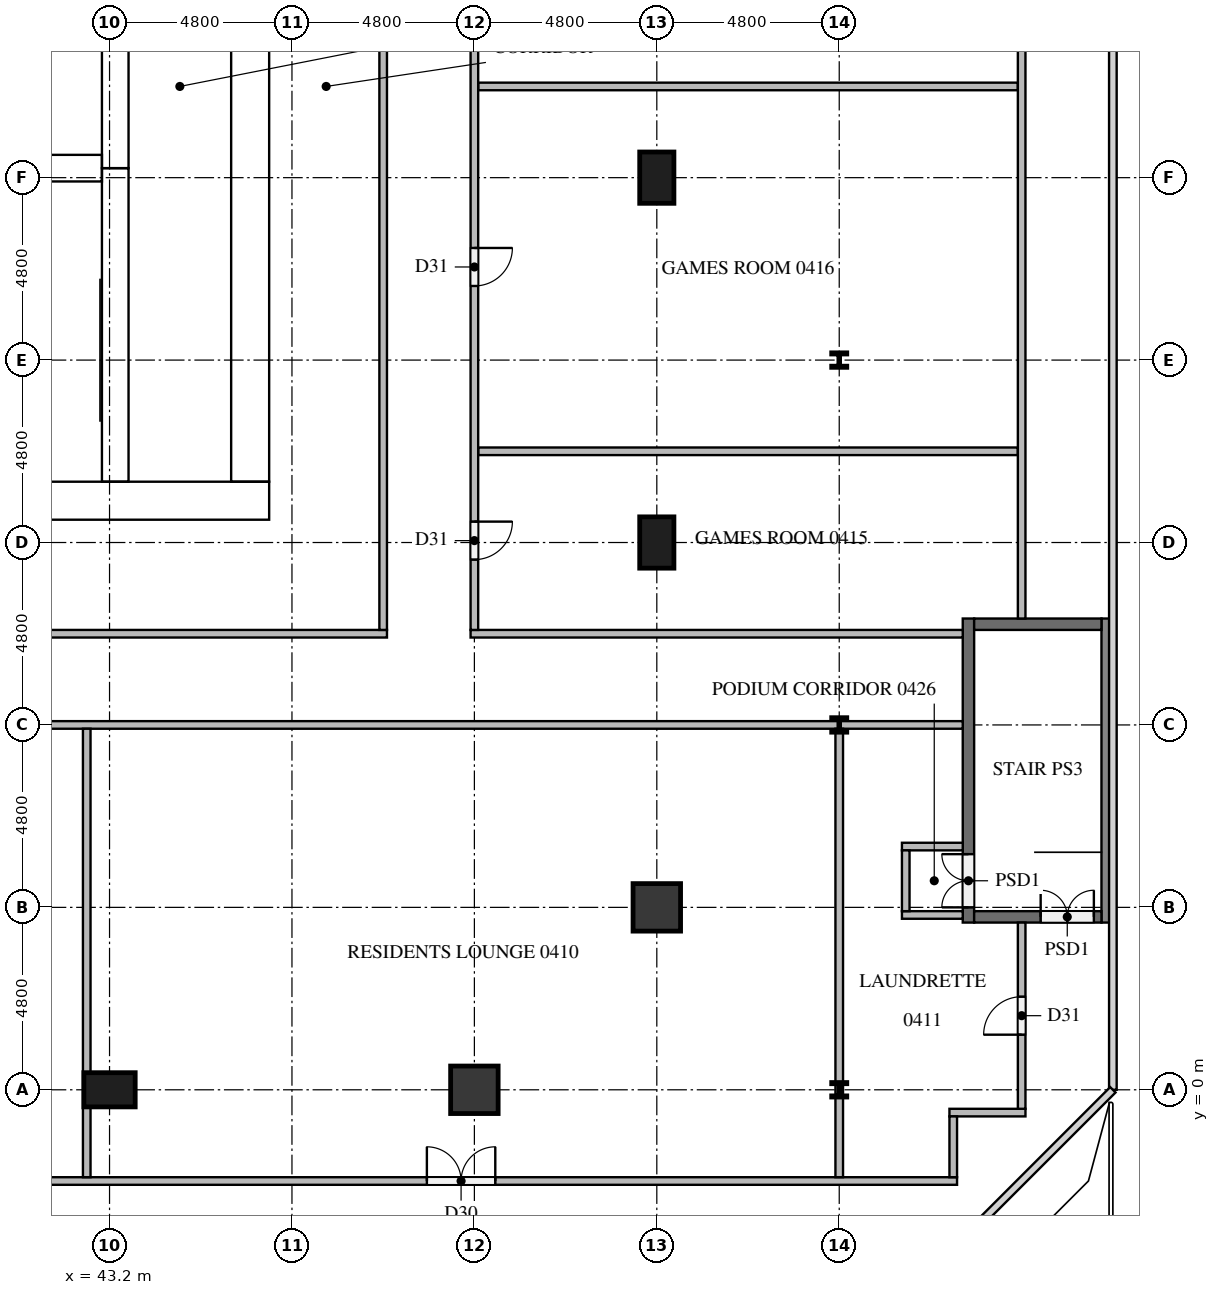
"""IFC4 building model, lengths in metres.
Left out: names, types, materials, properties, quantities, classifications, styles, units other than length and angle.
Written with IfcOpenShell. Run it as: python <this file> out.ifc"""

import sys

from ifc_helpers import new_model, si_unit, direction, frame, frame_2d, origin, origin_2d, place, context, subcontext, project, spatial, rectangle, i_section, extrude, element, fill, save


model = new_model("IFC4")
c1 = context("Model", 3, precision=1e-05, world=origin(), true_north=direction((0.0, 1.0)))
c2 = subcontext(c1, "Body", "Model", "MODEL_VIEW")
j1 = project(units=[si_unit("LENGTHUNIT", "METRE"), si_unit("PLANEANGLEUNIT", "RADIAN")], contexts=[c1])
p1 = place(None, origin())
s1 = spatial("IfcSite", under=j1, at=p1, CompositionType="ELEMENT")
p2 = place(p1, origin())
s2 = spatial("IfcBuilding", under=s1, at=p2, CompositionType="ELEMENT")
p3 = place(p2, frame((0.0, 0.0, 19.5)))
s3 = spatial("IfcBuildingStorey", under=s2, at=p3, CompositionType="ELEMENT", Elevation=19.5)
p4 = place(p3, frame((65.8, 4.4, 0.0), z_axis=(0.0, 0.0, 1.0), x_axis=(0.0, 1.0, 0.0)))
e1 = element("IfcWall", 1, at=p4, inside=s3, PredefinedType="SOLIDWALL", context=c2, shape_type="SweptSolid", body=[
    extrude(rectangle(XDim=8.0, YDim=0.3, at=frame_2d((4.0, 0.0))), origin(), (0.0, 0.0, 1.0), 4.1),
])
p5 = place(p4, frame((0.4, 0.0, 0.0)))
e2 = element("IfcOpeningElement", 2, at=p5, cuts=e1, PredefinedType="OPENING", context=c2, shape_type="SweptSolid", body=[
    extrude(rectangle(XDim=1.4, YDim=2.1, at=frame_2d((0.7, 1.05))), frame((0.0, 0.16, 0.0), z_axis=(0.0, -1.0, 0.0), x_axis=(1.0, 0.0, 0.0)), (0.0, 0.0, 1.0), 0.32),
])
p6 = place(p3, frame((69.45, 4.4, 0.0), z_axis=(0.0, 0.0, 1.0), x_axis=(0.0, 1.0, 0.0)))
e3 = element("IfcWall", 3, at=p6, inside=s3, PredefinedType="SOLIDWALL", context=c2, shape_type="SweptSolid", body=[
    extrude(rectangle(XDim=8.0, YDim=0.3, at=frame_2d((4.0, 0.0))), origin(), (0.0, 0.0, 1.0), 4.1),
])
p7 = place(p3, frame((65.95, 4.55, 0.0), z_axis=(0.0, 0.0, 1.0), x_axis=(1.0, 0.0, 0.0)))
e4 = element("IfcWall", 4, at=p7, inside=s3, PredefinedType="SOLIDWALL", context=c2, shape_type="SweptSolid", body=[
    extrude(rectangle(XDim=3.35, YDim=0.3, at=frame_2d((1.675, 0.0))), origin(), (0.0, 0.0, 1.0), 4.1),
])
p8 = place(p7, frame((1.75, 0.0, 0.0)))
e5 = element("IfcOpeningElement", 5, at=p8, cuts=e4, PredefinedType="OPENING", context=c2, shape_type="SweptSolid", body=[
    extrude(rectangle(XDim=1.4, YDim=2.1, at=frame_2d((0.7, 1.05))), frame((0.0, 0.16, 0.0), z_axis=(0.0, -1.0, 0.0), x_axis=(1.0, 0.0, 0.0)), (0.0, 0.0, 1.0), 0.32),
])
p9 = place(p3, frame((65.95, 12.25, 0.0), z_axis=(0.0, 0.0, 1.0), x_axis=(1.0, 0.0, 0.0)))
e6 = element("IfcWall", 6, at=p9, inside=s3, PredefinedType="SOLIDWALL", context=c2, shape_type="SweptSolid", body=[
    extrude(rectangle(XDim=3.35, YDim=0.3, at=frame_2d((1.675, 0.0))), origin(), (0.0, 0.0, 1.0), 4.1),
])
p10 = place(p3, frame((15.0, 15.5, 0.0), z_axis=(0.0, 0.0, 1.0), x_axis=(1.0, 0.0, 0.0)))
e7 = element("IfcWall", 7, at=p10, inside=s3, PredefinedType="SHEAR", context=c2, shape_type="SweptSolid", body=[
    extrude(rectangle(XDim=32.4, YDim=1.0, at=frame_2d((16.2, 0.0))), origin(), (0.0, 0.0, 1.0), 4.1),
])
p11 = place(p10, frame((15.3, 0.0, 0.0)))
e8 = element("IfcOpeningElement", 8, at=p11, cuts=e7, PredefinedType="OPENING", context=c2, shape_type="SweptSolid", body=[
    extrude(rectangle(XDim=1.8, YDim=2.1, at=frame_2d((0.9, 1.05))), frame((0.0, 0.51, 0.0), z_axis=(0.0, -1.0, 0.0), x_axis=(1.0, 0.0, 0.0)), (0.0, 0.0, 1.0), 1.02),
])
p12 = place(p3, frame((46.9, 16.0, 0.0), z_axis=(0.0, 0.0, 1.0), x_axis=(0.0, 1.0, 0.0)))
e9 = element("IfcWall", 9, at=p12, inside=s3, PredefinedType="SHEAR", context=c2, shape_type="SweptSolid", body=[
    extrude(rectangle(XDim=20.8, YDim=1.0, at=frame_2d((10.4, 0.0))), origin(), (0.0, 0.0, 1.0), 4.1),
])
p13 = place(p12, frame((10.1, 0.0, 0.0)))
e10 = element("IfcOpeningElement", 10, at=p13, cuts=e9, PredefinedType="OPENING", context=c2, shape_type="SweptSolid", body=[
    extrude(rectangle(XDim=1.2, YDim=2.1, at=frame_2d((0.6, 1.05))), frame((0.0, 0.51, 0.0), z_axis=(0.0, -1.0, 0.0), x_axis=(1.0, 0.0, 0.0)), (0.0, 0.0, 1.0), 1.02),
])
p14 = place(p3, frame((43.35, 16.0, 0.0), z_axis=(0.0, 0.0, 1.0), x_axis=(0.0, 1.0, 0.0)))
e11 = element("IfcWall", 11, at=p14, inside=s3, PredefinedType="SHEAR", context=c2, shape_type="SweptSolid", body=[
    extrude(rectangle(XDim=8.25, YDim=0.7, at=frame_2d((4.125, 0.0))), origin(), (0.0, 0.0, 1.0), 4.1),
])
p15 = place(p14, frame((0.2, 0.0, 0.0)))
e12 = element("IfcOpeningElement", 12, at=p15, cuts=e11, PredefinedType="OPENING", context=c2, shape_type="SweptSolid", body=[
    extrude(rectangle(XDim=1.2, YDim=2.1, at=frame_2d((0.6, 1.05))), frame((0.0, 0.36, 0.0), z_axis=(0.0, -1.0, 0.0), x_axis=(1.0, 0.0, 0.0)), (0.0, 0.0, 1.0), 0.72),
])
p16 = place(p3, frame((43.35, 24.25, 0.0), z_axis=(0.0, 0.0, 1.0), x_axis=(0.0, 1.0, 0.0)))
e13 = element("IfcWall", 13, at=p16, inside=s3, PredefinedType="SHEAR", context=c2, shape_type="SweptSolid", body=[
    extrude(rectangle(XDim=3.5, YDim=0.7, at=frame_2d((1.75, 0.0))), origin(), (0.0, 0.0, 1.0), 4.1),
])
p17 = place(p16, frame((1.2, 0.0, 0.0)))
e14 = element("IfcOpeningElement", 14, at=p17, cuts=e13, PredefinedType="OPENING", context=c2, shape_type="SweptSolid", body=[
    extrude(rectangle(XDim=1.1, YDim=2.1, at=frame_2d((0.55, 1.05))), frame((0.0, 0.36, 0.0), z_axis=(0.0, -1.0, 0.0), x_axis=(1.0, 0.0, 0.0)), (0.0, 0.0, 1.0), 0.72),
])
p18 = place(p3, frame((39.65, 24.25, 0.0), z_axis=(0.0, 0.0, 1.0), x_axis=(1.0, 0.0, 0.0)))
e15 = element("IfcWall", 15, at=p18, inside=s3, PredefinedType="SHEAR", context=c2, shape_type="SweptSolid", body=[
    extrude(rectangle(XDim=3.35, YDim=0.7, at=frame_2d((1.675, 0.0))), origin(), (0.0, 0.0, 1.0), 4.1),
])
p19 = place(p3, frame((43.2, 0.0, 0.0), z_axis=(0.0, 0.0, 1.0), x_axis=(1.0, 0.0, 0.0)))
e16 = element("IfcColumn", 16, at=p19, inside=s3, PredefinedType="COLUMN", context=c2, shape_type="SweptSolid", body=[
    extrude(rectangle(XDim=1.35, YDim=0.9, at=origin_2d()), origin(), (0.0, 0.0, 1.0), 4.1),
])
for number, where, z_axis, x_axis in (
    (17, (52.8, 0.0, 0.0), (0.0, 0.0, 1.0), (1.0, 0.0, 0.0)),
    (18, (57.6, 4.8, 0.0), (0.0, 0.0, 1.0), (1.0, 0.0, 0.0)),
):
    element("IfcColumn", number, at=place(p3, frame(where, z_axis=z_axis, x_axis=x_axis)), inside=s3, PredefinedType="COLUMN", context=c2, shape_type="SweptSolid", body=[
        extrude(rectangle(XDim=1.25, YDim=1.25, at=origin_2d()), origin(), (0.0, 0.0, 1.0), 4.1),
    ])
for number, where, z_axis, x_axis in (
    (19, (57.6, 14.4, 0.0), (0.0, 0.0, 1.0), (0.0, 1.0, 0.0)),
    (20, (57.6, 24.0, 0.0), (0.0, 0.0, 1.0), (0.0, 1.0, 0.0)),
):
    element("IfcColumn", number, at=place(p3, frame(where, z_axis=z_axis, x_axis=x_axis)), inside=s3, PredefinedType="COLUMN", context=c2, shape_type="SweptSolid", body=[
        extrude(rectangle(XDim=1.35, YDim=0.9, at=origin_2d()), origin(), (0.0, 0.0, 1.0), 4.1),
    ])
for number, where, z_axis, x_axis in (
    (21, (62.4, 0.0, 0.0), (0.0, 0.0, 1.0), (1.0, 0.0, 0.0)),
    (22, (62.4, 9.6, 0.0), (0.0, 0.0, 1.0), (1.0, 0.0, 0.0)),
    (23, (62.4, 19.2, 0.0), (0.0, 0.0, 1.0), (1.0, 0.0, 0.0)),
):
    element("IfcColumn", number, at=place(p3, frame(where, z_axis=z_axis, x_axis=x_axis)), inside=s3, PredefinedType="COLUMN", context=c2, shape_type="SweptSolid", body=[
        extrude(i_section(OverallWidth=0.396, OverallDepth=0.381, WebThickness=0.019, FlangeThickness=0.03, at=origin_2d()), origin(), (0.0, 0.0, 1.0), 4.1),
    ])
p20 = place(p3, frame((32.9, -2.4, 0.0), z_axis=(0.0, 0.0, 1.0), x_axis=(1.0, 0.0, 0.0)))
e24 = element("IfcWall", 24, at=p20, inside=s3, PredefinedType="PARTITIONING", context=c2, shape_type="SweptSolid", body=[
    extrude(rectangle(XDim=32.6, YDim=0.2, at=frame_2d((16.3, 0.0))), origin(), (0.0, 0.0, 1.0), 4.1),
])
p21 = place(p20, frame((18.65, 0.0, 0.0)))
e25 = element("IfcOpeningElement", 25, at=p21, cuts=e24, PredefinedType="OPENING", context=c2, shape_type="SweptSolid", body=[
    extrude(rectangle(XDim=1.8, YDim=2.1, at=frame_2d((0.9, 1.05))), frame((0.0, 0.11, 0.0), z_axis=(0.0, -1.0, 0.0), x_axis=(1.0, 0.0, 0.0)), (0.0, 0.0, 1.0), 0.22),
])
p22 = place(p3, frame((65.3, -0.6, 0.0), z_axis=(0.0, 0.0, 1.0), x_axis=(1.0, 0.0, 0.0)))
e26 = element("IfcWall", 26, at=p22, inside=s3, PredefinedType="PARTITIONING", context=c2, shape_type="SweptSolid", body=[
    extrude(rectangle(XDim=2.0, YDim=0.2, at=frame_2d((1.0, 0.0))), origin(), (0.0, 0.0, 1.0), 4.1),
])
for number, where, z_axis, x_axis in (
    (27, (64.05, 4.6, 0.0), (0.0, 0.0, 1.0), (1.0, 0.0, 0.0)),
    (28, (64.05, 6.4, 0.0), (0.0, 0.0, 1.0), (1.0, 0.0, 0.0)),
):
    element("IfcWall", number, at=place(p3, frame(where, z_axis=z_axis, x_axis=x_axis)), inside=s3, PredefinedType="PARTITIONING", context=c2, shape_type="SweptSolid", body=[
        extrude(rectangle(XDim=1.6, YDim=0.2, at=frame_2d((0.8, 0.0))), origin(), (0.0, 0.0, 1.0), 4.1),
    ])
p23 = place(p3, frame((65.65, 9.6, 0.0), z_axis=(0.0, 0.0, 1.0), x_axis=(-1.0, 0.0, 0.0)))
e29 = element("IfcWall", 29, at=p23, inside=s3, PredefinedType="PARTITIONING", context=c2, shape_type="SweptSolid", body=[
    extrude(rectangle(XDim=32.75, YDim=0.2, at=frame_2d((16.375, 0.0))), origin(), (0.0, 0.0, 1.0), 4.1),
])
p24 = place(p23, frame((27.0, 0.0, 0.0)))
e30 = element("IfcOpeningElement", 30, at=p24, cuts=e29, PredefinedType="OPENING", context=c2, shape_type="SweptSolid", body=[
    extrude(rectangle(XDim=1.8, YDim=2.1, at=frame_2d((0.9, 1.05))), frame((0.0, 0.11, 0.0), z_axis=(0.0, -1.0, 0.0), x_axis=(1.0, 0.0, 0.0)), (0.0, 0.0, 1.0), 0.22),
])
p25 = place(p3, frame((11.9, 12.0, 0.0), z_axis=(0.0, 0.0, 1.0), x_axis=(1.0, 0.0, 0.0)))
e31 = element("IfcWall", 31, at=p25, inside=s3, PredefinedType="PARTITIONING", context=c2, shape_type="SweptSolid", body=[
    extrude(rectangle(XDim=38.6, YDim=0.2, at=frame_2d((19.3, 0.0))), origin(), (0.0, 0.0, 1.0), 4.1),
])
p26 = place(p25, frame((18.45, 0.0, 0.0)))
e32 = element("IfcOpeningElement", 32, at=p26, cuts=e31, PredefinedType="OPENING", context=c2, shape_type="SweptSolid", body=[
    extrude(rectangle(XDim=1.8, YDim=2.1, at=frame_2d((0.9, 1.05))), frame((0.0, 0.11, 0.0), z_axis=(0.0, -1.0, 0.0), x_axis=(1.0, 0.0, 0.0)), (0.0, 0.0, 1.0), 0.22),
])
p27 = place(p3, frame((52.7, 12.0, 0.0), z_axis=(0.0, 0.0, 1.0), x_axis=(1.0, 0.0, 0.0)))
e33 = element("IfcWall", 33, at=p27, inside=s3, PredefinedType="PARTITIONING", context=c2, shape_type="SweptSolid", body=[
    extrude(rectangle(XDim=12.95, YDim=0.2, at=frame_2d((6.475, 0.0))), origin(), (0.0, 0.0, 1.0), 4.1),
])
for number, where, z_axis, x_axis in (
    (34, (52.9, 16.8, 0.0), (0.0, 0.0, 1.0), (1.0, 0.0, 0.0)),
    (35, (52.9, 26.4, 0.0), (0.0, 0.0, 1.0), (1.0, 0.0, 0.0)),
):
    element("IfcWall", number, at=place(p3, frame(where, z_axis=z_axis, x_axis=x_axis)), inside=s3, PredefinedType="PARTITIONING", context=c2, shape_type="SweptSolid", body=[
        extrude(rectangle(XDim=14.2, YDim=0.2, at=frame_2d((7.1, 0.0))), origin(), (0.0, 0.0, 1.0), 4.1),
    ])
p28 = place(p3, frame((42.6, -2.3, 0.0), z_axis=(0.0, 0.0, 1.0), x_axis=(0.0, 1.0, 0.0)))
e36 = element("IfcWall", 36, at=p28, inside=s3, PredefinedType="PARTITIONING", context=c2, shape_type="SweptSolid", body=[
    extrude(rectangle(XDim=11.8, YDim=0.2, at=frame_2d((5.9, 0.0))), origin(), (0.0, 0.0, 1.0), 4.1),
])
p29 = place(p3, frame((50.4, 12.1, 0.0), z_axis=(0.0, 0.0, 1.0), x_axis=(0.0, 1.0, 0.0)))
e37 = element("IfcWall", 37, at=p29, inside=s3, PredefinedType="PARTITIONING", context=c2, shape_type="SweptSolid", body=[
    extrude(rectangle(XDim=28.6, YDim=0.2, at=frame_2d((14.3, 0.0))), origin(), (0.0, 0.0, 1.0), 4.1),
])
p30 = place(p29, frame((20.05, 0.0, 0.0)))
e38 = element("IfcOpeningElement", 38, at=p30, cuts=e37, PredefinedType="OPENING", context=c2, shape_type="SweptSolid", body=[
    extrude(rectangle(XDim=1.8, YDim=2.1, at=frame_2d((0.9, 1.05))), frame((0.0, 0.11, 0.0), z_axis=(0.0, -1.0, 0.0), x_axis=(1.0, 0.0, 0.0)), (0.0, 0.0, 1.0), 0.22),
])
p31 = place(p3, frame((52.8, 40.7, 0.0), z_axis=(0.0, 0.0, 1.0), x_axis=(0.0, -1.0, 0.0)))
e39 = element("IfcWall", 39, at=p31, inside=s3, PredefinedType="PARTITIONING", context=c2, shape_type="SweptSolid", body=[
    extrude(rectangle(XDim=28.6, YDim=0.2, at=frame_2d((14.3, 0.0))), origin(), (0.0, 0.0, 1.0), 4.1),
])
p32 = place(p31, frame((25.75, 0.0, 0.0)))
e40 = element("IfcOpeningElement", 40, at=p32, cuts=e39, PredefinedType="OPENING", context=c2, shape_type="SweptSolid", body=[
    extrude(rectangle(XDim=1.0, YDim=2.1, at=frame_2d((0.5, 1.05))), frame((0.0, 0.11, 0.0), z_axis=(0.0, -1.0, 0.0), x_axis=(1.0, 0.0, 0.0)), (0.0, 0.0, 1.0), 0.22),
])
p33 = place(p31, frame((18.55, 0.0, 0.0)))
e41 = element("IfcOpeningElement", 41, at=p33, cuts=e39, PredefinedType="OPENING", context=c2, shape_type="SweptSolid", body=[
    extrude(rectangle(XDim=1.0, YDim=2.1, at=frame_2d((0.5, 1.05))), frame((0.0, 0.11, 0.0), z_axis=(0.0, -1.0, 0.0), x_axis=(1.0, 0.0, 0.0)), (0.0, 0.0, 1.0), 0.22),
])
p34 = place(p3, frame((62.4, -2.3, 0.0), z_axis=(0.0, 0.0, 1.0), x_axis=(0.0, 1.0, 0.0)))
e42 = element("IfcWall", 42, at=p34, inside=s3, PredefinedType="PARTITIONING", context=c2, shape_type="SweptSolid", body=[
    extrude(rectangle(XDim=11.8, YDim=0.2, at=frame_2d((5.9, 0.0))), origin(), (0.0, 0.0, 1.0), 4.1),
])
for number, where, z_axis, x_axis in (
    (43, (64.15, 4.7, 0.0), (0.0, 0.0, 1.0), (0.0, 1.0, 0.0)),
    (44, (65.4, -2.3, 0.0), (0.0, 0.0, 1.0), (0.0, 1.0, 0.0)),
):
    element("IfcWall", number, at=place(p3, frame(where, z_axis=z_axis, x_axis=x_axis)), inside=s3, PredefinedType="PARTITIONING", context=c2, shape_type="SweptSolid", body=[
        extrude(rectangle(XDim=1.6, YDim=0.2, at=frame_2d((0.8, 0.0))), origin(), (0.0, 0.0, 1.0), 4.1),
    ])
p35 = place(p3, frame((67.2, -0.5, 0.0), z_axis=(0.0, 0.0, 1.0), x_axis=(0.0, 1.0, 0.0)))
e45 = element("IfcWall", 45, at=p35, inside=s3, PredefinedType="PARTITIONING", context=c2, shape_type="SweptSolid", body=[
    extrude(rectangle(XDim=4.9, YDim=0.2, at=frame_2d((2.45, 0.0))), origin(), (0.0, 0.0, 1.0), 4.1),
])
p36 = place(p35, frame((1.95, 0.0, 0.0)))
e46 = element("IfcOpeningElement", 46, at=p36, cuts=e45, PredefinedType="OPENING", context=c2, shape_type="SweptSolid", body=[
    extrude(rectangle(XDim=1.0, YDim=2.1, at=frame_2d((0.5, 1.05))), frame((0.0, 0.11, 0.0), z_axis=(0.0, -1.0, 0.0), x_axis=(1.0, 0.0, 0.0)), (0.0, 0.0, 1.0), 0.22),
])
p37 = place(p3, frame((67.2, 12.4, 0.0), z_axis=(0.0, 0.0, 1.0), x_axis=(0.0, 1.0, 0.0)))
e47 = element("IfcWall", 47, at=p37, inside=s3, PredefinedType="PARTITIONING", context=c2, shape_type="SweptSolid", body=[
    extrude(rectangle(XDim=28.3, YDim=0.2, at=frame_2d((14.15, 0.0))), origin(), (0.0, 0.0, 1.0), 4.1),
])
p38 = place(p37, frame((20.65, 0.0, 0.0)))
e48 = element("IfcOpeningElement", 48, at=p38, cuts=e47, PredefinedType="OPENING", context=c2, shape_type="SweptSolid", body=[
    extrude(rectangle(XDim=1.0, YDim=2.1, at=frame_2d((0.5, 1.05))), frame((0.0, 0.11, 0.0), z_axis=(0.0, -1.0, 0.0), x_axis=(1.0, 0.0, 0.0)), (0.0, 0.0, 1.0), 0.22),
])
p39 = place(p17, origin())
e49 = element("IfcDoor", 49, at=p39, inside=s3, OperationType="DOUBLE_DOOR_SLIDING", PredefinedType="DOOR", context=c2, shape_type="SweptSolid", body=[
    extrude(rectangle(XDim=1.1, YDim=2.1, at=frame_2d((0.55, 1.05))), frame((0.0, 0.025, 0.0), z_axis=(0.0, -1.0, 0.0), x_axis=(1.0, 0.0, 0.0)), (0.0, 0.0, 1.0), 0.05),
])
fill(e14, e49)
p40 = place(p15, origin())
e50 = element("IfcDoor", 50, at=p40, inside=s3, OperationType="SINGLE_SWING_LEFT", PredefinedType="DOOR", context=c2, shape_type="SweptSolid", body=[
    extrude(rectangle(XDim=1.2, YDim=2.1, at=frame_2d((0.6, 1.05))), frame((0.0, 0.025, 0.0), z_axis=(0.0, -1.0, 0.0), x_axis=(1.0, 0.0, 0.0)), (0.0, 0.0, 1.0), 0.05),
])
fill(e12, e50)
p41 = place(p13, origin())
e51 = element("IfcDoor", 51, at=p41, inside=s3, OperationType="SINGLE_SWING_RIGHT", PredefinedType="DOOR", context=c2, shape_type="SweptSolid", body=[
    extrude(rectangle(XDim=1.2, YDim=2.1, at=frame_2d((0.6, 1.05))), frame((0.0, 0.025, 0.0), z_axis=(0.0, -1.0, 0.0), x_axis=(1.0, 0.0, 0.0)), (0.0, 0.0, 1.0), 0.05),
])
fill(e10, e51)
p42 = place(p5, frame((1.4, 0.0, 0.0), z_axis=(0.0, 0.0, 1.0), x_axis=(-1.0, 0.0, 0.0)))
e52 = element("IfcDoor", 52, at=p42, inside=s3, OperationType="DOUBLE_DOOR_SINGLE_SWING", PredefinedType="DOOR", context=c2, shape_type="SweptSolid", body=[
    extrude(rectangle(XDim=1.4, YDim=2.1, at=frame_2d((0.7, 1.05))), frame((0.0, 0.025, 0.0), z_axis=(0.0, -1.0, 0.0), x_axis=(1.0, 0.0, 0.0)), (0.0, 0.0, 1.0), 0.05),
])
fill(e2, e52)
p43 = place(p8, origin())
e53 = element("IfcDoor", 53, at=p43, inside=s3, OperationType="DOUBLE_DOOR_SINGLE_SWING", PredefinedType="DOOR", context=c2, shape_type="SweptSolid", body=[
    extrude(rectangle(XDim=1.4, YDim=2.1, at=frame_2d((0.7, 1.05))), frame((0.0, 0.025, 0.0), z_axis=(0.0, -1.0, 0.0), x_axis=(1.0, 0.0, 0.0)), (0.0, 0.0, 1.0), 0.05),
])
fill(e5, e53)
p44 = place(p21, origin())
e54 = element("IfcDoor", 54, at=p44, inside=s3, OperationType="DOUBLE_DOOR_SINGLE_SWING", PredefinedType="DOOR", context=c2, shape_type="SweptSolid", body=[
    extrude(rectangle(XDim=1.8, YDim=2.1, at=frame_2d((0.9, 1.05))), frame((0.0, 0.025, 0.0), z_axis=(0.0, -1.0, 0.0), x_axis=(1.0, 0.0, 0.0)), (0.0, 0.0, 1.0), 0.05),
])
fill(e25, e54)
p45 = place(p36, origin())
e55 = element("IfcDoor", 55, at=p45, inside=s3, OperationType="SINGLE_SWING_LEFT", PredefinedType="DOOR", context=c2, shape_type="SweptSolid", body=[
    extrude(rectangle(XDim=1.0, YDim=2.1, at=frame_2d((0.5, 1.05))), frame((0.0, 0.025, 0.0), z_axis=(0.0, -1.0, 0.0), x_axis=(1.0, 0.0, 0.0)), (0.0, 0.0, 1.0), 0.05),
])
fill(e46, e55)
p46 = place(p32, origin())
e56 = element("IfcDoor", 56, at=p46, inside=s3, OperationType="SINGLE_SWING_LEFT", PredefinedType="DOOR", context=c2, shape_type="SweptSolid", body=[
    extrude(rectangle(XDim=1.0, YDim=2.1, at=frame_2d((0.5, 1.05))), frame((0.0, 0.025, 0.0), z_axis=(0.0, -1.0, 0.0), x_axis=(1.0, 0.0, 0.0)), (0.0, 0.0, 1.0), 0.05),
])
fill(e40, e56)
p47 = place(p33, origin())
e57 = element("IfcDoor", 57, at=p47, inside=s3, OperationType="SINGLE_SWING_LEFT", PredefinedType="DOOR", context=c2, shape_type="SweptSolid", body=[
    extrude(rectangle(XDim=1.0, YDim=2.1, at=frame_2d((0.5, 1.05))), frame((0.0, 0.025, 0.0), z_axis=(0.0, -1.0, 0.0), x_axis=(1.0, 0.0, 0.0)), (0.0, 0.0, 1.0), 0.05),
])
fill(e41, e57)
save(model, sys.argv[1])
